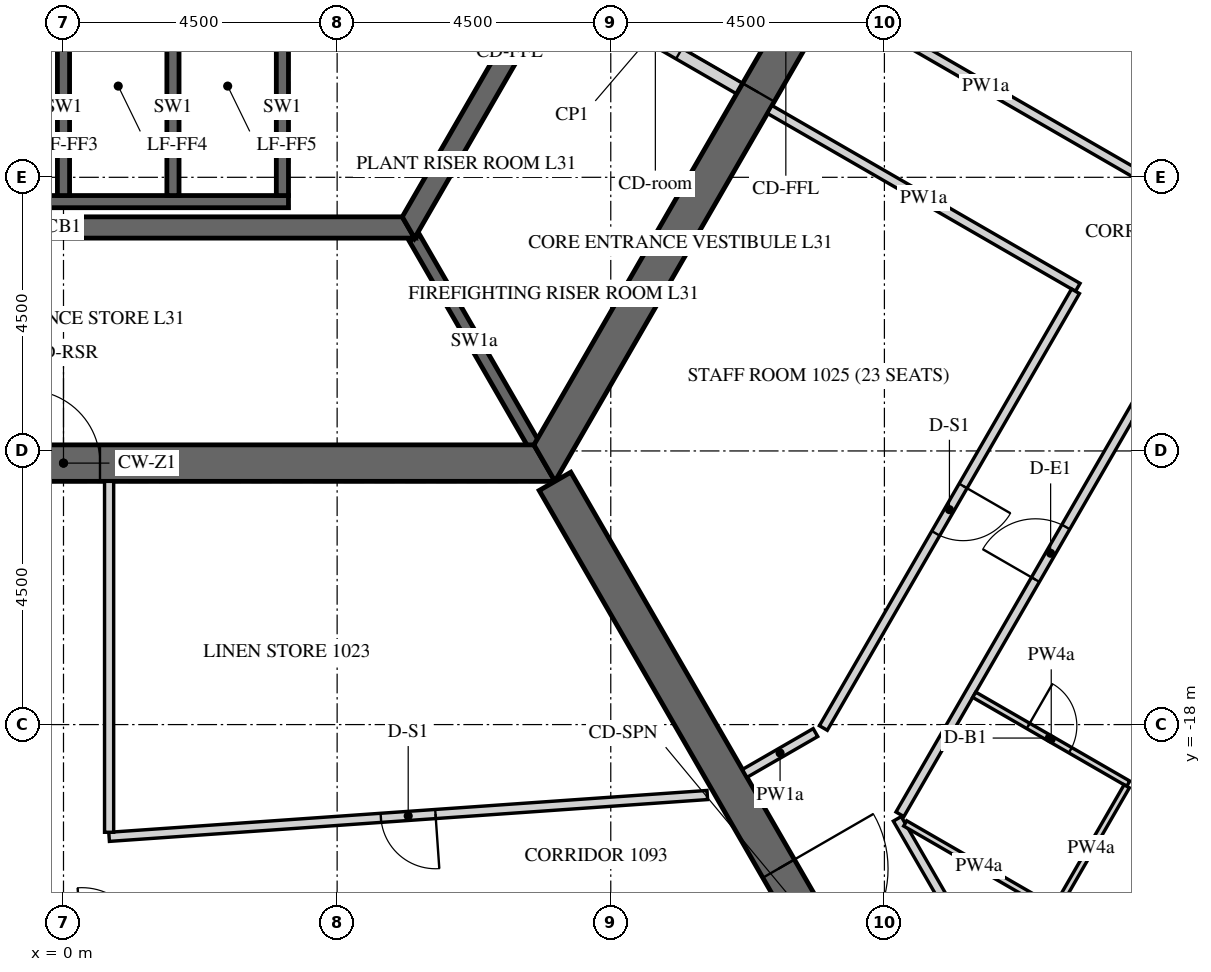
"""IFC4 building model, lengths in metres.
Left out: names, types, materials, properties, quantities, classifications, styles, units other than length and angle.
Written with IfcOpenShell. Run it as: python <this file> out.ifc"""

import sys

from ifc_helpers import new_model, si_unit, direction, frame, frame_2d, origin, place, context, subcontext, project, spatial, polyline, rectangle, outline, extrude, element, fill, save


model = new_model("IFC4")
c1 = context("Model", 3, precision=1e-05, world=origin(), true_north=direction((0.0, 1.0)))
c2 = subcontext(c1, "Body", "Model", "MODEL_VIEW")
j1 = project(units=[si_unit("LENGTHUNIT", "METRE"), si_unit("PLANEANGLEUNIT", "RADIAN")], contexts=[c1])
p1 = place(None, origin())
s1 = spatial("IfcSite", under=j1, at=p1, CompositionType="ELEMENT")
p2 = place(p1, origin())
s2 = spatial("IfcBuilding", under=s1, at=p2, CompositionType="ELEMENT")
p3 = place(p2, frame((0.0, 0.0, 135.0)))
s3 = spatial("IfcBuildingStorey", under=s2, at=p3, CompositionType="ELEMENT", Elevation=135.0)
p4 = place(p3, frame((-7.91, -13.7, -0.15), z_axis=(0.0, 0.0, 1.0), x_axis=(1.0, 0.0, 0.0)))
e1 = element("IfcWall", 1, at=p4, inside=s3, PredefinedType="SHEAR", context=c2, shape_type="SweptSolid", body=[
    extrude(outline(polyline([(-0.173, -0.3), (15.993, -0.3), (15.646, 0.3), (0.173, 0.3), (-0.173, -0.3)])), origin(), (0.0, 0.0, 1.0), 3.9),
])
p5 = place(p4, frame((7.31, 0.0, 0.15)))
e2 = element("IfcOpeningElement", 2, at=p5, cuts=e1, PredefinedType="OPENING", context=c2, shape_type="SweptSolid", body=[
    extrude(rectangle(XDim=1.2, YDim=2.4, at=frame_2d((0.6, 1.2))), frame((0.0, 0.31, 0.0), z_axis=(0.0, -1.0, 0.0), x_axis=(1.0, 0.0, 0.0)), (0.0, 0.0, 1.0), 0.62),
])
p6 = place(p3, frame((7.91, -13.7, -0.15), z_axis=(0.0, 0.0, 1.0), x_axis=(0.499999880136, 0.866025472988, 0.0)))
e3 = element("IfcWall", 3, at=p6, inside=s3, PredefinedType="SHEAR", context=c2, shape_type="SweptSolid", body=[
    extrude(outline(polyline([(-0.173, -0.3), (15.993, -0.3), (15.646, 0.3), (0.173, 0.3), (-0.173, -0.3)])), origin(), (0.0, 0.0, 1.0), 3.9),
])
p7 = place(p6, frame((7.039, 0.0, 0.15)))
e4 = element("IfcOpeningElement", 4, at=p7, cuts=e3, PredefinedType="OPENING", context=c2, shape_type="SweptSolid", body=[
    extrude(rectangle(XDim=1.8, YDim=2.4, at=frame_2d((0.9, 1.2))), frame((0.0, 0.31, 0.0), z_axis=(0.0, -1.0, 0.0), x_axis=(1.0, 0.0, 0.0)), (0.0, 0.0, 1.0), 0.62),
])
p8 = place(p3, frame((8.083, -14.0, -0.15), z_axis=(0.0, 0.0, 1.0), x_axis=(0.499997680643, -0.866026742862, 0.0)))
e5 = element("IfcWall", 5, at=p8, inside=s3, PredefinedType="SHEAR", context=c2, shape_type="SweptSolid", body=[
    extrude(rectangle(XDim=16.509, YDim=0.6, at=frame_2d((8.254, 0.0))), origin(), (0.0, 0.0, 1.0), 3.9),
])
p9 = place(p8, frame((7.354, 0.0, 0.15)))
e6 = element("IfcOpeningElement", 6, at=p9, cuts=e5, PredefinedType="OPENING", context=c2, shape_type="SweptSolid", body=[
    extrude(rectangle(XDim=1.8, YDim=2.4, at=frame_2d((0.9, 1.2))), frame((0.0, 0.31, 0.0), z_axis=(0.0, -1.0, 0.0), x_axis=(1.0, 0.0, 0.0)), (0.0, 0.0, 1.0), 0.62),
])
p10 = place(p3, frame((-5.673, -9.825, -0.15), z_axis=(0.0, 0.0, 1.0), x_axis=(1.0, 0.0, 0.0)))
e7 = element("IfcWall", 7, at=p10, inside=s3, PredefinedType="SHEAR", context=c2, shape_type="SweptSolid", body=[
    extrude(outline(polyline([(-0.101, -0.175), (11.446, -0.175), (11.244, 0.175), (0.101, 0.175), (-0.101, -0.175)])), origin(), (0.0, 0.0, 1.0), 3.9),
])
p11 = place(p3, frame((5.673, -9.825, -0.15), z_axis=(0.0, 0.0, 1.0), x_axis=(0.499995046907, 0.866028263435, 0.0)))
e8 = element("IfcWall", 8, at=p11, inside=s3, PredefinedType="SHEAR", context=c2, shape_type="SweptSolid", body=[
    extrude(outline(polyline([(-0.101, -0.175), (11.446, -0.175), (11.244, 0.175), (0.101, 0.175), (-0.101, -0.175)])), origin(), (0.0, 0.0, 1.0), 3.9),
])
p12 = place(p11, frame((4.801, 0.0, 0.15)))
e9 = element("IfcOpeningElement", 9, at=p12, cuts=e8, PredefinedType="OPENING", context=c2, shape_type="SweptSolid", body=[
    extrude(rectangle(XDim=1.8, YDim=2.4, at=frame_2d((0.9, 1.2))), frame((0.0, 0.185, 0.0), z_axis=(0.0, -1.0, 0.0), x_axis=(1.0, 0.0, 0.0)), (0.0, 0.0, 1.0), 0.37),
])
p13 = place(p3, frame((-5.5, -9.4, -0.25), z_axis=(0.0, 0.0, 1.0), x_axis=(1.0, 0.0, 0.0)))
e10 = element("IfcWall", 10, at=p13, inside=s3, PredefinedType="SHEAR", context=c2, shape_type="SweptSolid", body=[
    extrude(rectangle(XDim=9.2, YDim=0.2, at=frame_2d((4.6, 0.0))), origin(), (0.0, 0.0, 1.0), 3.9),
])
for number, where, z_axis, x_axis in (
    (11, (0.0, -9.3, -0.25), (0.0, 0.0, 1.0), (0.0, 1.0, 0.0)),
    (12, (1.8, -9.3, -0.25), (0.0, 0.0, 1.0), (0.0, 1.0, 0.0)),
    (13, (3.6, -9.3, -0.25), (0.0, 0.0, 1.0), (0.0, 1.0, 0.0)),
):
    element("IfcWall", number, at=place(p3, frame(where, z_axis=z_axis, x_axis=x_axis)), inside=s3, PredefinedType="SHEAR", context=c2, shape_type="SweptSolid", body=[
        extrude(rectangle(XDim=2.9, YDim=0.2, at=frame_2d((1.45, 0.0))), origin(), (0.0, 0.0, 1.0), 3.9),
    ])
p14 = place(p3, frame((5.773, -10.0, -0.15), z_axis=(0.0, 0.0, 1.0), x_axis=(0.500038251005, -0.86600331843, 0.0)))
e14 = element("IfcWall", 14, at=p14, inside=s3, PredefinedType="SHEAR", context=c2, shape_type="SweptSolid", body=[
    extrude(rectangle(XDim=3.926, YDim=0.2, at=frame_2d((1.963, 0.0))), origin(), (0.0, 0.0, 1.0), 3.9),
])
p15 = place(p3, frame((8.175, -5.841, 0.0), z_axis=(0.0, 0.0, 1.0), x_axis=(0.866020560687, -0.500008388397, 0.0)))
e15 = element("IfcWall", 15, at=p15, inside=s3, PredefinedType="PARTITIONING", context=c2, shape_type="SweptSolid", body=[
    extrude(rectangle(XDim=3.4, YDim=0.2, at=frame_2d((1.7, 0.0))), origin(), (0.0, 0.0, 1.0), 3.65),
])
p16 = place(p15, frame((1.35, 0.0, 0.0)))
e16 = element("IfcOpeningElement", 16, at=p16, cuts=e15, PredefinedType="OPENING", context=c2, shape_type="SweptSolid", body=[
    extrude(rectangle(XDim=0.9, YDim=2.1, at=frame_2d((0.45, 1.05))), frame((0.0, 0.11, 0.0), z_axis=(0.0, -1.0, 0.0), x_axis=(1.0, 0.0, 0.0)), (0.0, 0.0, 1.0), 0.22),
])
p17 = place(p3, frame((10.587, -19.158, 0.0), z_axis=(0.0, 0.0, 1.0), x_axis=(-0.997565137136, -0.069740928955, 0.0)))
e17 = element("IfcWall", 17, at=p17, inside=s3, PredefinedType="PARTITIONING", context=c2, shape_type="SweptSolid", body=[
    extrude(rectangle(XDim=9.861, YDim=0.15, at=frame_2d((4.931, 0.0))), origin(), (0.0, 0.0, 1.0), 2.838),
])
p18 = place(p17, frame((4.481, 0.0, 0.0)))
e18 = element("IfcOpeningElement", 18, at=p18, cuts=e17, PredefinedType="OPENING", context=c2, shape_type="SweptSolid", body=[
    extrude(rectangle(XDim=0.9, YDim=2.1, at=frame_2d((0.45, 1.05))), frame((0.0, 0.085, 0.0), z_axis=(0.0, -1.0, 0.0), x_axis=(1.0, 0.0, 0.0)), (0.0, 0.0, 1.0), 0.17),
])
p19 = place(p3, frame((0.75, -19.771, 0.0), z_axis=(0.0, 0.0, 1.0), x_axis=(0.0, 1.0, 0.0)))
e19 = element("IfcWall", 19, at=p19, inside=s3, PredefinedType="PARTITIONING", context=c2, shape_type="SweptSolid", body=[
    extrude(rectangle(XDim=5.771, YDim=0.15, at=frame_2d((2.885, 0.0))), origin(), (0.0, 0.0, 1.0), 2.838),
])
p20 = place(p3, frame((15.441, -22.545, 0.0), z_axis=(0.0, 0.0, 1.0), x_axis=(-0.500003541824, 0.866023358902, 0.0)))
e20 = element("IfcWall", 20, at=p20, inside=s3, PredefinedType="PARTITIONING", context=c2, shape_type="SweptSolid", body=[
    extrude(rectangle(XDim=3.458, YDim=0.15, at=frame_2d((1.729, 0.0))), origin(), (0.0, 0.0, 1.0), 2.838),
])
p21 = place(p3, frame((13.755, -19.475, 0.0), z_axis=(0.0, 0.0, 1.0), x_axis=(0.50000013933, 0.866025323342, 0.0)))
e21 = element("IfcWall", 21, at=p21, inside=s3, PredefinedType="PARTITIONING", context=c2, shape_type="SweptSolid", body=[
    extrude(rectangle(XDim=23.517, YDim=0.15, at=frame_2d((11.758, 0.0))), origin(), (0.0, 0.0, 1.0), 2.838),
])
p22 = place(p21, frame((4.456, 0.0, 0.0)))
e22 = element("IfcOpeningElement", 22, at=p22, cuts=e21, PredefinedType="OPENING", context=c2, shape_type="SweptSolid", body=[
    extrude(rectangle(XDim=1.0, YDim=2.1, at=frame_2d((0.5, 1.05))), frame((0.0, 0.085, 0.0), z_axis=(0.0, -1.0, 0.0), x_axis=(1.0, 0.0, 0.0)), (0.0, 0.0, 1.0), 0.17),
])
p23 = place(p21, frame((13.699, 0.0, 0.0)))
e23 = element("IfcOpeningElement", 23, at=p23, cuts=e21, PredefinedType="OPENING", context=c2, shape_type="SweptSolid", body=[
    extrude(rectangle(XDim=1.0, YDim=2.1, at=frame_2d((0.5, 1.05))), frame((0.0, 0.085, 0.0), z_axis=(0.0, -1.0, 0.0), x_axis=(1.0, 0.0, 0.0)), (0.0, 0.0, 1.0), 0.17),
])
p24 = place(p21, frame((21.658, 0.0, 0.0)))
e24 = element("IfcOpeningElement", 24, at=p24, cuts=e21, PredefinedType="OPENING", context=c2, shape_type="SweptSolid", body=[
    extrude(rectangle(XDim=1.0, YDim=2.1, at=frame_2d((0.5, 1.05))), frame((0.0, 0.085, 0.0), z_axis=(0.0, -1.0, 0.0), x_axis=(1.0, 0.0, 0.0)), (0.0, 0.0, 1.0), 0.17),
])
p25 = place(p3, frame((17.665, -8.953, 0.0), z_axis=(0.0, 0.0, 1.0), x_axis=(-0.866025774745, 0.499999357477, 0.0)))
e25 = element("IfcWall", 25, at=p25, inside=s3, PredefinedType="PARTITIONING", context=c2, shape_type="SweptSolid", body=[
    extrude(rectangle(XDim=5.775, YDim=0.15, at=frame_2d((2.887, 0.0))), origin(), (0.0, 0.0, 1.0), 2.838),
])
p26 = place(p3, frame((11.614, -7.884, 0.0), z_axis=(0.0, 0.0, 1.0), x_axis=(0.866018092707, -0.500012662943, 0.0)))
e26 = element("IfcWall", 26, at=p26, inside=s3, PredefinedType="PARTITIONING", context=c2, shape_type="SweptSolid", body=[
    extrude(rectangle(XDim=5.85, YDim=0.15, at=frame_2d((2.925, 0.0))), origin(), (0.0, 0.0, 1.0), 2.838),
])
p27 = place(p3, frame((16.643, -10.874, 0.0), z_axis=(0.0, 0.0, 1.0), x_axis=(-0.50000192383, -0.866024293058, 0.0)))
e27 = element("IfcWall", 27, at=p27, inside=s3, PredefinedType="PARTITIONING", context=c2, shape_type="SweptSolid", body=[
    extrude(rectangle(XDim=8.293, YDim=0.15, at=frame_2d((4.146, 0.0))), origin(), (0.0, 0.0, 1.0), 2.838),
])
p28 = place(p27, frame((3.697, 0.0, 0.0)))
e28 = element("IfcOpeningElement", 28, at=p28, cuts=e27, PredefinedType="OPENING", context=c2, shape_type="SweptSolid", body=[
    extrude(rectangle(XDim=0.9, YDim=2.1, at=frame_2d((0.45, 1.05))), frame((0.0, 0.085, 0.0), z_axis=(0.0, -1.0, 0.0), x_axis=(1.0, 0.0, 0.0)), (0.0, 0.0, 1.0), 0.17),
])
p29 = place(p3, frame((12.366, -18.131, 0.0), z_axis=(0.0, 0.0, 1.0), x_axis=(-0.866043397086, -0.499968833392, 0.0)))
e29 = element("IfcWall", 29, at=p29, inside=s3, PredefinedType="PARTITIONING", context=c2, shape_type="SweptSolid", body=[
    extrude(rectangle(XDim=1.344, YDim=0.15, at=frame_2d((0.672, 0.0))), origin(), (0.0, 0.0, 1.0), 2.838),
])
p30 = place(p3, frame((14.977, -17.509, 0.0), z_axis=(0.0, 0.0, 1.0), x_axis=(0.866046596414, -0.499963291492, 0.0)))
e30 = element("IfcWall", 30, at=p30, inside=s3, PredefinedType="PARTITIONING", context=c2, shape_type="SweptSolid", body=[
    extrude(rectangle(XDim=2.925, YDim=0.1, at=frame_2d((1.462, 0.0))), origin(), (0.0, 0.0, 1.0), 2.838),
])
p31 = place(p30, frame((1.025, 0.0, 0.0)))
e31 = element("IfcOpeningElement", 31, at=p31, cuts=e30, PredefinedType="OPENING", context=c2, shape_type="SweptSolid", body=[
    extrude(rectangle(XDim=0.8, YDim=2.1, at=frame_2d((0.4, 1.05))), frame((0.0, 0.06, 0.0), z_axis=(0.0, -1.0, 0.0), x_axis=(1.0, 0.0, 0.0)), (0.0, 0.0, 1.0), 0.12),
])
p32 = place(p3, frame((17.485, -19.015, 0.0), z_axis=(0.0, 0.0, 1.0), x_axis=(-0.500016218704, -0.866016039709, 0.0)))
e32 = element("IfcWall", 32, at=p32, inside=s3, PredefinedType="PARTITIONING", context=c2, shape_type="SweptSolid", body=[
    extrude(rectangle(XDim=2.35, YDim=0.1, at=frame_2d((1.175, 0.0))), origin(), (0.0, 0.0, 1.0), 2.838),
])
p33 = place(p3, frame((16.267, -21.025, 0.0), z_axis=(0.0, 0.0, 1.0), x_axis=(-0.866034573852, 0.49998411664, 0.0)))
e33 = element("IfcWall", 33, at=p33, inside=s3, PredefinedType="PARTITIONING", context=c2, shape_type="SweptSolid", body=[
    extrude(rectangle(XDim=2.8, YDim=0.1, at=frame_2d((1.4, 0.0))), origin(), (0.0, 0.0, 1.0), 2.838),
])
p34 = place(p3, frame((24.31, -16.794, 0.0), z_axis=(0.0, 0.0, 1.0), x_axis=(-0.866027174938, 0.499996932259, 0.0)))
e34 = element("IfcWall", 34, at=p34, inside=s3, PredefinedType="PARTITIONING", context=c2, shape_type="SweptSolid", body=[
    extrude(rectangle(XDim=7.725, YDim=0.18, at=frame_2d((3.863, 0.0))), origin(), (0.0, 0.0, 1.0), 2.838),
])
p35 = place(p7, origin())
e35 = element("IfcDoor", 35, at=p35, inside=s3, OperationType="DOUBLE_DOOR_SINGLE_SWING", PredefinedType="DOOR", context=c2, shape_type="SweptSolid", body=[
    extrude(rectangle(XDim=1.8, YDim=2.4, at=frame_2d((0.9, 1.2))), frame((0.0, 0.025, 0.0), z_axis=(0.0, -1.0, 0.0), x_axis=(1.0, 0.0, 0.0)), (0.0, 0.0, 1.0), 0.05),
])
fill(e4, e35)
p36 = place(p5, origin())
e36 = element("IfcDoor", 36, at=p36, inside=s3, OperationType="SINGLE_SWING_LEFT", PredefinedType="DOOR", context=c2, shape_type="SweptSolid", body=[
    extrude(rectangle(XDim=1.2, YDim=2.4, at=frame_2d((0.6, 1.2))), frame((0.0, 0.025, 0.0), z_axis=(0.0, -1.0, 0.0), x_axis=(1.0, 0.0, 0.0)), (0.0, 0.0, 1.0), 0.05),
])
fill(e2, e36)
p37 = place(p9, origin())
e37 = element("IfcDoor", 37, at=p37, inside=s3, OperationType="DOUBLE_DOOR_SINGLE_SWING", PredefinedType="DOOR", context=c2, shape_type="SweptSolid", body=[
    extrude(rectangle(XDim=1.8, YDim=2.4, at=frame_2d((0.9, 1.2))), frame((0.0, 0.025, 0.0), z_axis=(0.0, -1.0, 0.0), x_axis=(1.0, 0.0, 0.0)), (0.0, 0.0, 1.0), 0.05),
])
fill(e6, e37)
p38 = place(p16, origin())
e38 = element("IfcDoor", 38, at=p38, inside=s3, OperationType="SINGLE_SWING_LEFT", PredefinedType="DOOR", context=c2, shape_type="SweptSolid", body=[
    extrude(rectangle(XDim=0.9, YDim=2.1, at=frame_2d((0.45, 1.05))), frame((0.0, 0.025, 0.0), z_axis=(0.0, -1.0, 0.0), x_axis=(1.0, 0.0, 0.0)), (0.0, 0.0, 1.0), 0.05),
])
fill(e16, e38)
p39 = place(p22, origin())
e39 = element("IfcDoor", 39, at=p39, inside=s3, OperationType="SINGLE_SWING_LEFT", PredefinedType="DOOR", context=c2, shape_type="SweptSolid", body=[
    extrude(rectangle(XDim=1.0, YDim=2.1, at=frame_2d((0.5, 1.05))), frame((0.0, 0.025, 0.0), z_axis=(0.0, -1.0, 0.0), x_axis=(1.0, 0.0, 0.0)), (0.0, 0.0, 1.0), 0.05),
])
fill(e22, e39)
p40 = place(p31, origin())
e40 = element("IfcDoor", 40, at=p40, inside=s3, OperationType="SINGLE_SWING_RIGHT", PredefinedType="DOOR", context=c2, shape_type="SweptSolid", body=[
    extrude(rectangle(XDim=0.8, YDim=2.1, at=frame_2d((0.4, 1.05))), frame((0.0, 0.025, 0.0), z_axis=(0.0, -1.0, 0.0), x_axis=(1.0, 0.0, 0.0)), (0.0, 0.0, 1.0), 0.05),
])
fill(e31, e40)
p41 = place(p18, origin())
e41 = element("IfcDoor", 41, at=p41, inside=s3, OperationType="SINGLE_SWING_RIGHT", PredefinedType="DOOR", context=c2, shape_type="SweptSolid", body=[
    extrude(rectangle(XDim=0.9, YDim=2.1, at=frame_2d((0.45, 1.05))), frame((0.0, 0.025, 0.0), z_axis=(0.0, -1.0, 0.0), x_axis=(1.0, 0.0, 0.0)), (0.0, 0.0, 1.0), 0.05),
])
fill(e18, e41)
p42 = place(p28, origin())
e42 = element("IfcDoor", 42, at=p42, inside=s3, OperationType="SINGLE_SWING_RIGHT", PredefinedType="DOOR", context=c2, shape_type="SweptSolid", body=[
    extrude(rectangle(XDim=0.9, YDim=2.1, at=frame_2d((0.45, 1.05))), frame((0.0, 0.025, 0.0), z_axis=(0.0, -1.0, 0.0), x_axis=(1.0, 0.0, 0.0)), (0.0, 0.0, 1.0), 0.05),
])
fill(e28, e42)
save(model, sys.argv[1])
